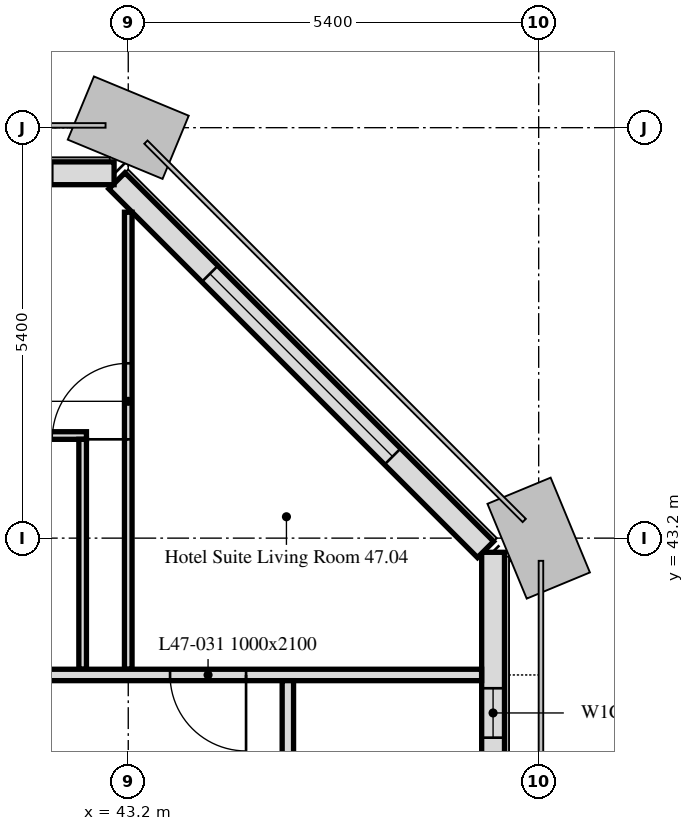
"""IFC4 building model, lengths in metres.
Left out: names, types, materials, properties, quantities, classifications, styles, units other than length and angle.
Written with IfcOpenShell. Run it as: python <this file> out.ifc"""

import sys

from ifc_helpers import new_model, si_unit, direction, frame, frame_2d, origin, place, context, subcontext, project, spatial, rectangle, extrude, element, fill, save


model = new_model("IFC4")
c1 = context("Model", 3, precision=1e-05, world=origin(), true_north=direction((0.0, 1.0)))
c2 = subcontext(c1, "Body", "Model", "MODEL_VIEW")
j1 = project(units=[si_unit("LENGTHUNIT", "METRE"), si_unit("PLANEANGLEUNIT", "RADIAN")], contexts=[c1])
p1 = place(None, origin())
s1 = spatial("IfcSite", under=j1, at=p1, CompositionType="ELEMENT")
p2 = place(p1, origin())
s2 = spatial("IfcBuilding", under=s1, at=p2, CompositionType="ELEMENT")
p3 = place(p2, frame((0.0, 0.0, 193.9)))
s3 = spatial("IfcBuildingStorey", under=s2, at=p3, CompositionType="ELEMENT", Elevation=193.9)
p4 = place(p3, frame((48.0, 10.986, 0.0), z_axis=(0.0, 0.0, 1.0), x_axis=(0.0, 1.0, 0.0)))
e1 = element("IfcWall", 1, at=p4, inside=s3, PredefinedType="SOLIDWALL", context=c2, shape_type="SweptSolid", body=[
    extrude(rectangle(XDim=32.027, YDim=0.3, at=frame_2d((16.014, 0.0))), origin(), (0.0, 0.0, 1.0), 3.0),
])
p5 = place(p4, frame((1.164, 0.0, 0.9)))
e2 = element("IfcOpeningElement", 2, at=p5, cuts=e1, PredefinedType="OPENING", context=c2, shape_type="SweptSolid", body=[
    extrude(rectangle(XDim=1.1, YDim=1.7, at=frame_2d((0.55, 0.85))), frame((0.0, 0.16, 0.0), z_axis=(0.0, -1.0, 0.0), x_axis=(1.0, 0.0, 0.0)), (0.0, 0.0, 1.0), 0.32),
])
p6 = place(p4, frame((2.764, 0.0, 0.9)))
e3 = element("IfcOpeningElement", 3, at=p6, cuts=e1, PredefinedType="OPENING", context=c2, shape_type="SweptSolid", body=[
    extrude(rectangle(XDim=1.1, YDim=1.7, at=frame_2d((0.55, 0.85))), frame((0.0, 0.16, 0.0), z_axis=(0.0, -1.0, 0.0), x_axis=(1.0, 0.0, 0.0)), (0.0, 0.0, 1.0), 0.32),
])
p7 = place(p4, frame((6.564, 0.0, 0.9)))
e4 = element("IfcOpeningElement", 4, at=p7, cuts=e1, PredefinedType="OPENING", context=c2, shape_type="SweptSolid", body=[
    extrude(rectangle(XDim=1.1, YDim=1.7, at=frame_2d((0.55, 0.85))), frame((0.0, 0.16, 0.0), z_axis=(0.0, -1.0, 0.0), x_axis=(1.0, 0.0, 0.0)), (0.0, 0.0, 1.0), 0.32),
])
p8 = place(p4, frame((8.164, 0.0, 0.9)))
e5 = element("IfcOpeningElement", 5, at=p8, cuts=e1, PredefinedType="OPENING", context=c2, shape_type="SweptSolid", body=[
    extrude(rectangle(XDim=1.1, YDim=1.7, at=frame_2d((0.55, 0.85))), frame((0.0, 0.16, 0.0), z_axis=(0.0, -1.0, 0.0), x_axis=(1.0, 0.0, 0.0)), (0.0, 0.0, 1.0), 0.32),
])
p9 = place(p4, frame((11.964, 0.0, 0.9)))
e6 = element("IfcOpeningElement", 6, at=p9, cuts=e1, PredefinedType="OPENING", context=c2, shape_type="SweptSolid", body=[
    extrude(rectangle(XDim=1.1, YDim=1.7, at=frame_2d((0.55, 0.85))), frame((0.0, 0.16, 0.0), z_axis=(0.0, -1.0, 0.0), x_axis=(1.0, 0.0, 0.0)), (0.0, 0.0, 1.0), 0.32),
])
p10 = place(p4, frame((13.564, 0.0, 0.9)))
e7 = element("IfcOpeningElement", 7, at=p10, cuts=e1, PredefinedType="OPENING", context=c2, shape_type="SweptSolid", body=[
    extrude(rectangle(XDim=1.1, YDim=1.7, at=frame_2d((0.55, 0.85))), frame((0.0, 0.16, 0.0), z_axis=(0.0, -1.0, 0.0), x_axis=(1.0, 0.0, 0.0)), (0.0, 0.0, 1.0), 0.32),
])
p11 = place(p4, frame((17.364, 0.0, 0.9)))
e8 = element("IfcOpeningElement", 8, at=p11, cuts=e1, PredefinedType="OPENING", context=c2, shape_type="SweptSolid", body=[
    extrude(rectangle(XDim=1.1, YDim=1.7, at=frame_2d((0.55, 0.85))), frame((0.0, 0.16, 0.0), z_axis=(0.0, -1.0, 0.0), x_axis=(1.0, 0.0, 0.0)), (0.0, 0.0, 1.0), 0.32),
])
p12 = place(p4, frame((18.964, 0.0, 0.9)))
e9 = element("IfcOpeningElement", 9, at=p12, cuts=e1, PredefinedType="OPENING", context=c2, shape_type="SweptSolid", body=[
    extrude(rectangle(XDim=1.1, YDim=1.7, at=frame_2d((0.55, 0.85))), frame((0.0, 0.16, 0.0), z_axis=(0.0, -1.0, 0.0), x_axis=(1.0, 0.0, 0.0)), (0.0, 0.0, 1.0), 0.32),
])
p13 = place(p4, frame((22.414, 0.0, 0.9)))
e10 = element("IfcOpeningElement", 10, at=p13, cuts=e1, PredefinedType="OPENING", context=c2, shape_type="SweptSolid", body=[
    extrude(rectangle(XDim=3.4, YDim=1.7, at=frame_2d((1.7, 0.85))), frame((0.0, 0.16, 0.0), z_axis=(0.0, -1.0, 0.0), x_axis=(1.0, 0.0, 0.0)), (0.0, 0.0, 1.0), 0.32),
])
p14 = place(p4, frame((28.164, 0.0, 0.9)))
e11 = element("IfcOpeningElement", 11, at=p14, cuts=e1, PredefinedType="OPENING", context=c2, shape_type="SweptSolid", body=[
    extrude(rectangle(XDim=1.1, YDim=1.7, at=frame_2d((0.55, 0.85))), frame((0.0, 0.16, 0.0), z_axis=(0.0, -1.0, 0.0), x_axis=(1.0, 0.0, 0.0)), (0.0, 0.0, 1.0), 0.32),
])
p15 = place(p4, frame((29.589, 0.0, 0.9)))
e12 = element("IfcOpeningElement", 12, at=p15, cuts=e1, PredefinedType="OPENING", context=c2, shape_type="SweptSolid", body=[
    extrude(rectangle(XDim=0.65, YDim=1.7, at=frame_2d((0.325, 0.85))), frame((0.0, 0.16, 0.0), z_axis=(0.0, -1.0, 0.0), x_axis=(1.0, 0.0, 0.0)), (0.0, 0.0, 1.0), 0.32),
])
p16 = place(p3, frame((47.901, 43.051, 0.0), z_axis=(0.0, 0.0, 1.0), x_axis=(-0.707106781187, 0.707106781187, 0.0)))
e13 = element("IfcWall", 13, at=p16, inside=s3, PredefinedType="SOLIDWALL", context=c2, shape_type="SweptSolid", body=[
    extrude(rectangle(XDim=6.86, YDim=0.3, at=frame_2d((3.43, 0.0))), origin(), (0.0, 0.0, 1.0), 3.0),
])
p17 = place(p16, frame((1.73, 0.0, 0.9)))
e14 = element("IfcOpeningElement", 14, at=p17, cuts=e13, PredefinedType="OPENING", context=c2, shape_type="SweptSolid", body=[
    extrude(rectangle(XDim=3.4, YDim=1.7, at=frame_2d((1.7, 0.85))), frame((0.0, 0.16, 0.0), z_axis=(0.0, -1.0, 0.0), x_axis=(1.0, 0.0, 0.0)), (0.0, 0.0, 1.0), 0.32),
])
p18 = place(p3, frame((43.014, 48.0, 0.0), z_axis=(0.0, 0.0, 1.0), x_axis=(-1.0, 0.0, 0.0)))
e15 = element("IfcWall", 15, at=p18, inside=s3, PredefinedType="SOLIDWALL", context=c2, shape_type="SweptSolid", body=[
    extrude(rectangle(XDim=32.027, YDim=0.3, at=frame_2d((16.014, 0.0))), origin(), (0.0, 0.0, 1.0), 3.0),
])
p19 = place(p18, frame((0.814, 0.0, 0.9)))
e16 = element("IfcOpeningElement", 16, at=p19, cuts=e15, PredefinedType="OPENING", context=c2, shape_type="SweptSolid", body=[
    extrude(rectangle(XDim=3.4, YDim=1.7, at=frame_2d((1.7, 0.85))), frame((0.0, 0.16, 0.0), z_axis=(0.0, -1.0, 0.0), x_axis=(1.0, 0.0, 0.0)), (0.0, 0.0, 1.0), 0.32),
])
p20 = place(p18, frame((6.564, 0.0, 0.9)))
e17 = element("IfcOpeningElement", 17, at=p20, cuts=e15, PredefinedType="OPENING", context=c2, shape_type="SweptSolid", body=[
    extrude(rectangle(XDim=1.1, YDim=1.7, at=frame_2d((0.55, 0.85))), frame((0.0, 0.16, 0.0), z_axis=(0.0, -1.0, 0.0), x_axis=(1.0, 0.0, 0.0)), (0.0, 0.0, 1.0), 0.32),
])
p21 = place(p18, frame((11.614, 0.0, 0.9)))
e18 = element("IfcOpeningElement", 18, at=p21, cuts=e15, PredefinedType="OPENING", context=c2, shape_type="SweptSolid", body=[
    extrude(rectangle(XDim=3.4, YDim=1.7, at=frame_2d((1.7, 0.85))), frame((0.0, 0.16, 0.0), z_axis=(0.0, -1.0, 0.0), x_axis=(1.0, 0.0, 0.0)), (0.0, 0.0, 1.0), 0.32),
])
p22 = place(p18, frame((17.364, 0.0, 0.9)))
e19 = element("IfcOpeningElement", 19, at=p22, cuts=e15, PredefinedType="OPENING", context=c2, shape_type="SweptSolid", body=[
    extrude(rectangle(XDim=1.1, YDim=1.7, at=frame_2d((0.55, 0.85))), frame((0.0, 0.16, 0.0), z_axis=(0.0, -1.0, 0.0), x_axis=(1.0, 0.0, 0.0)), (0.0, 0.0, 1.0), 0.32),
])
p23 = place(p18, frame((22.414, 0.0, 0.9)))
e20 = element("IfcOpeningElement", 20, at=p23, cuts=e15, PredefinedType="OPENING", context=c2, shape_type="SweptSolid", body=[
    extrude(rectangle(XDim=3.4, YDim=1.7, at=frame_2d((1.7, 0.85))), frame((0.0, 0.16, 0.0), z_axis=(0.0, -1.0, 0.0), x_axis=(1.0, 0.0, 0.0)), (0.0, 0.0, 1.0), 0.32),
])
p24 = place(p18, frame((28.164, 0.0, 0.9)))
e21 = element("IfcOpeningElement", 21, at=p24, cuts=e15, PredefinedType="OPENING", context=c2, shape_type="SweptSolid", body=[
    extrude(rectangle(XDim=1.1, YDim=1.7, at=frame_2d((0.55, 0.85))), frame((0.0, 0.16, 0.0), z_axis=(0.0, -1.0, 0.0), x_axis=(1.0, 0.0, 0.0)), (0.0, 0.0, 1.0), 0.32),
])
p25 = place(p3, frame((40.25, 44.55, 0.0), z_axis=(0.0, 0.0, 1.0), x_axis=(1.0, 0.0, 0.0)))
e22 = element("IfcWall", 22, at=p25, inside=s3, PredefinedType="PARTITIONING", context=c2, shape_type="SweptSolid", body=[
    extrude(rectangle(XDim=2.4, YDim=0.1, at=frame_2d((1.2, 0.0))), origin(), (0.0, 0.0, 1.0), 3.0),
])
p26 = place(p3, frame((42.6, 44.5, 0.0), z_axis=(0.0, 0.0, 1.0), x_axis=(0.0, -1.0, 0.0)))
e23 = element("IfcWall", 23, at=p26, inside=s3, PredefinedType="PARTITIONING", context=c2, shape_type="SweptSolid", body=[
    extrude(rectangle(XDim=3.025, YDim=0.1, at=frame_2d((1.512, 0.0))), origin(), (0.0, 0.0, 1.0), 3.0),
])
p27 = place(p3, frame((43.2, 41.475, 0.0), z_axis=(0.0, 0.0, 1.0), x_axis=(0.0, 1.0, 0.0)))
e24 = element("IfcWall", 24, at=p27, inside=s3, PredefinedType="PARTITIONING", context=c2, shape_type="SweptSolid", body=[
    extrude(rectangle(XDim=6.013, YDim=0.1, at=frame_2d((3.006, 0.0))), origin(), (0.0, 0.0, 1.0), 3.0),
])
p28 = place(p27, frame((3.025, 0.0, 0.0)))
e25 = element("IfcOpeningElement", 25, at=p28, cuts=e24, PredefinedType="OPENING", context=c2, shape_type="SweptSolid", body=[
    extrude(rectangle(XDim=1.0, YDim=2.1, at=frame_2d((0.5, 1.05))), frame((0.0, 0.05, 0.0), z_axis=(0.0, -1.0, 0.0), x_axis=(1.0, 0.0, 0.0)), (0.0, 0.0, 1.0), 0.1),
])
p29 = place(p3, frame((47.849, 41.4, 0.0), z_axis=(0.0, 0.0, 1.0), x_axis=(-1.0, 0.0, 0.0)))
e26 = element("IfcWall", 26, at=p29, inside=s3, PredefinedType="PARTITIONING", context=c2, shape_type="SweptSolid", body=[
    extrude(rectangle(XDim=41.698, YDim=0.15, at=frame_2d((20.849, 0.0))), origin(), (0.0, 0.0, 1.0), 2.4),
])
p30 = place(p29, frame((39.249, 0.0, 0.0)))
e27 = element("IfcOpeningElement", 27, at=p30, cuts=e26, PredefinedType="OPENING", context=c2, shape_type="SweptSolid", body=[
    extrude(rectangle(XDim=1.0, YDim=2.1, at=frame_2d((0.5, 1.05))), frame((0.0, 0.075, 0.0), z_axis=(0.0, -1.0, 0.0), x_axis=(1.0, 0.0, 0.0)), (0.0, 0.0, 1.0), 0.15),
])
p31 = place(p29, frame((11.449, 0.0, 0.0)))
e28 = element("IfcOpeningElement", 28, at=p31, cuts=e26, PredefinedType="OPENING", context=c2, shape_type="SweptSolid", body=[
    extrude(rectangle(XDim=1.0, YDim=2.1, at=frame_2d((0.5, 1.05))), frame((0.0, 0.075, 0.0), z_axis=(0.0, -1.0, 0.0), x_axis=(1.0, 0.0, 0.0)), (0.0, 0.0, 1.0), 0.15),
])
p32 = place(p29, frame((3.099, 0.0, 0.0)))
e29 = element("IfcOpeningElement", 29, at=p32, cuts=e26, PredefinedType="OPENING", context=c2, shape_type="SweptSolid", body=[
    extrude(rectangle(XDim=1.0, YDim=2.1, at=frame_2d((0.5, 1.05))), frame((0.0, 0.075, 0.0), z_axis=(0.0, -1.0, 0.0), x_axis=(1.0, 0.0, 0.0)), (0.0, 0.0, 1.0), 0.15),
])
p33 = place(p29, frame((23.049, 0.0, 0.0)))
e30 = element("IfcOpeningElement", 30, at=p33, cuts=e26, PredefinedType="OPENING", context=c2, shape_type="SweptSolid", body=[
    extrude(rectangle(XDim=1.0, YDim=2.1, at=frame_2d((0.5, 1.05))), frame((0.0, 0.075, 0.0), z_axis=(0.0, -1.0, 0.0), x_axis=(1.0, 0.0, 0.0)), (0.0, 0.0, 1.0), 0.15),
])
p34 = place(p3, frame((45.3, 41.325, 0.0), z_axis=(0.0, 0.0, 1.0), x_axis=(0.0, -1.0, 0.0)))
e31 = element("IfcWall", 31, at=p34, inside=s3, PredefinedType="PARTITIONING", context=c2, shape_type="SweptSolid", body=[
    extrude(rectangle(XDim=29.55, YDim=0.15, at=frame_2d((14.775, 0.0))), origin(), (0.0, 0.0, 1.0), 2.4),
])
p35 = place(p34, frame((5.467, 0.0, 0.0)))
e32 = element("IfcOpeningElement", 32, at=p35, cuts=e31, PredefinedType="OPENING", context=c2, shape_type="SweptSolid", body=[
    extrude(rectangle(XDim=1.0, YDim=2.1, at=frame_2d((0.5, 1.05))), frame((0.0, 0.075, 0.0), z_axis=(0.0, -1.0, 0.0), x_axis=(1.0, 0.0, 0.0)), (0.0, 0.0, 1.0), 0.15),
])
p36 = place(p34, frame((11.125, 0.0, 0.0)))
e33 = element("IfcOpeningElement", 33, at=p36, cuts=e31, PredefinedType="OPENING", context=c2, shape_type="SweptSolid", body=[
    extrude(rectangle(XDim=1.0, YDim=2.1, at=frame_2d((0.5, 1.05))), frame((0.0, 0.075, 0.0), z_axis=(0.0, -1.0, 0.0), x_axis=(1.0, 0.0, 0.0)), (0.0, 0.0, 1.0), 0.15),
])
p37 = place(p34, frame((26.875, 0.0, 0.0)))
e34 = element("IfcOpeningElement", 34, at=p37, cuts=e31, PredefinedType="OPENING", context=c2, shape_type="SweptSolid", body=[
    extrude(rectangle(XDim=1.0, YDim=2.1, at=frame_2d((0.5, 1.05))), frame((0.0, 0.075, 0.0), z_axis=(0.0, -1.0, 0.0), x_axis=(1.0, 0.0, 0.0)), (0.0, 0.0, 1.0), 0.15),
])
p38 = place(p34, frame((20.575, 0.0, 0.0)))
e35 = element("IfcOpeningElement", 35, at=p38, cuts=e31, PredefinedType="OPENING", context=c2, shape_type="SweptSolid", body=[
    extrude(rectangle(XDim=1.0, YDim=2.1, at=frame_2d((0.5, 1.05))), frame((0.0, 0.075, 0.0), z_axis=(0.0, -1.0, 0.0), x_axis=(1.0, 0.0, 0.0)), (0.0, 0.0, 1.0), 0.15),
])
p39 = place(p15, origin())
e36 = element("IfcWindow", 36, at=p39, inside=s3, PartitioningType="SINGLE_PANEL", PredefinedType="WINDOW", context=c2, shape_type="SweptSolid", body=[
    extrude(rectangle(XDim=0.65, YDim=1.7, at=frame_2d((0.325, 0.85))), frame((0.0, 0.03, 0.0), z_axis=(0.0, -1.0, 0.0), x_axis=(1.0, 0.0, 0.0)), (0.0, 0.0, 1.0), 0.06),
])
fill(e12, e36)
p40 = place(p17, origin())
e37 = element("IfcWindow", 37, at=p40, inside=s3, PartitioningType="SINGLE_PANEL", PredefinedType="WINDOW", context=c2, shape_type="SweptSolid", body=[
    extrude(rectangle(XDim=3.4, YDim=1.7, at=frame_2d((1.7, 0.85))), frame((0.0, 0.03, 0.0), z_axis=(0.0, -1.0, 0.0), x_axis=(1.0, 0.0, 0.0)), (0.0, 0.0, 1.0), 0.06),
])
fill(e14, e37)
p41 = place(p28, origin())
e38 = element("IfcDoor", 38, at=p41, inside=s3, OperationType="SINGLE_SWING_LEFT", PredefinedType="DOOR", context=c2, shape_type="SweptSolid", body=[
    extrude(rectangle(XDim=1.0, YDim=2.1, at=frame_2d((0.5, 1.05))), frame((0.0, 0.025, 0.0), z_axis=(0.0, -1.0, 0.0), x_axis=(1.0, 0.0, 0.0)), (0.0, 0.0, 1.0), 0.05),
])
fill(e25, e38)
p42 = place(p32, origin())
e39 = element("IfcDoor", 39, at=p42, inside=s3, OperationType="SINGLE_SWING_LEFT", PredefinedType="DOOR", context=c2, shape_type="SweptSolid", body=[
    extrude(rectangle(XDim=1.0, YDim=2.1, at=frame_2d((0.5, 1.05))), frame((0.0, 0.025, 0.0), z_axis=(0.0, -1.0, 0.0), x_axis=(1.0, 0.0, 0.0)), (0.0, 0.0, 1.0), 0.05),
])
fill(e29, e39)
save(model, sys.argv[1])
